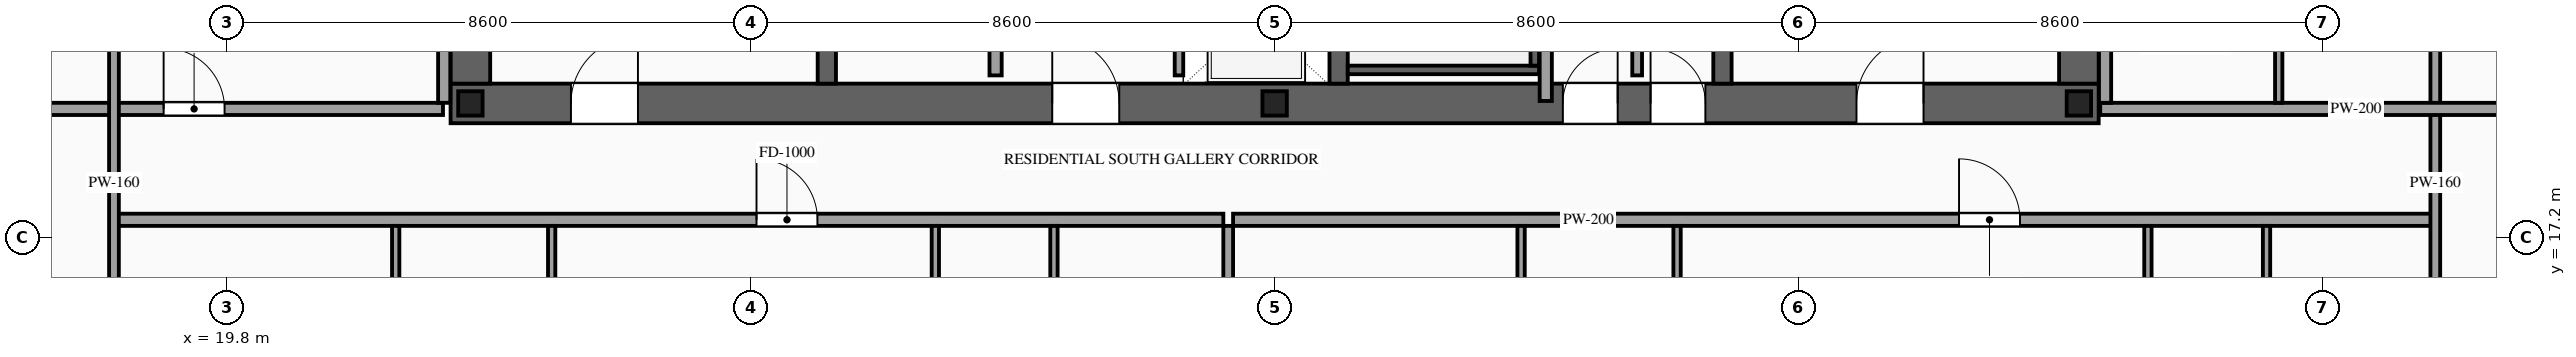
"""IFC4 building model, lengths in metres.
Left out: names, types, materials, properties, quantities, classifications, styles, units other than length and angle.
Written with IfcOpenShell. Run it as: python <this file> out.ifc"""

import sys

from ifc_helpers import new_model, si_unit, direction, frame, frame_2d, origin, origin_2d, place, context, subcontext, project, spatial, rectangle, i_section, extrude, source, transform, mapped, element, fill, save


model = new_model("IFC4")
c1 = context("Model", 3, precision=1e-05, world=origin(), true_north=direction((0.0, 1.0)))
c2 = subcontext(c1, "Body", "Model", "MODEL_VIEW")
j1 = project(units=[si_unit("LENGTHUNIT", "METRE"), si_unit("PLANEANGLEUNIT", "RADIAN")], contexts=[c1])
p1 = place(None, origin())
s1 = spatial("IfcSite", under=j1, at=p1, CompositionType="ELEMENT")
p2 = place(p1, origin())
s2 = spatial("IfcBuilding", under=s1, at=p2, CompositionType="ELEMENT")
p3 = place(p2, frame((0.0, 0.0, 195.0)))
s3 = spatial("IfcBuildingStorey", under=s2, at=p3, CompositionType="ELEMENT", Elevation=195.0)
p4 = place(p3, frame((23.475, 19.4, 0.0), z_axis=(0.0, 0.0, 1.0), x_axis=(1.0, 0.0, 0.0)))
e1 = element("IfcWall", 1, at=p4, inside=s3, PredefinedType="SHEAR", context=c2, shape_type="SweptSolid", body=[
    extrude(rectangle(XDim=27.05, YDim=0.65, at=frame_2d((13.525, 0.0))), origin(), (0.0, 0.0, 1.0), 3.5),
])
p5 = place(p4, frame((1.975, 0.0, 0.0)))
e2 = element("IfcOpeningElement", 2, at=p5, cuts=e1, PredefinedType="OPENING", context=c2, shape_type="SweptSolid", body=[
    extrude(rectangle(XDim=1.1, YDim=2.2, at=frame_2d((0.55, 1.1))), frame((0.0, 0.34, 0.0), z_axis=(0.0, -1.0, 0.0), x_axis=(1.0, 0.0, 0.0)), (0.0, 0.0, 1.0), 0.68),
])
p6 = place(p4, frame((9.875, 0.0, 0.0)))
e3 = element("IfcOpeningElement", 3, at=p6, cuts=e1, PredefinedType="OPENING", context=c2, shape_type="SweptSolid", body=[
    extrude(rectangle(XDim=1.1, YDim=2.2, at=frame_2d((0.55, 1.1))), frame((0.0, 0.34, 0.0), z_axis=(0.0, -1.0, 0.0), x_axis=(1.0, 0.0, 0.0)), (0.0, 0.0, 1.0), 0.68),
])
p7 = place(p4, frame((23.075, 0.0, 0.0)))
e4 = element("IfcOpeningElement", 4, at=p7, cuts=e1, PredefinedType="OPENING", context=c2, shape_type="SweptSolid", body=[
    extrude(rectangle(XDim=1.1, YDim=2.2, at=frame_2d((0.55, 1.1))), frame((0.0, 0.34, 0.0), z_axis=(0.0, -1.0, 0.0), x_axis=(1.0, 0.0, 0.0)), (0.0, 0.0, 1.0), 0.68),
])
p8 = place(p4, frame((19.695, 0.0, 0.0)))
e5 = element("IfcOpeningElement", 5, at=p8, cuts=e1, PredefinedType="OPENING", context=c2, shape_type="SweptSolid", body=[
    extrude(rectangle(XDim=0.9, YDim=2.15, at=frame_2d((0.45, 1.075))), frame((0.0, 0.34, 0.0), z_axis=(0.0, -1.0, 0.0), x_axis=(1.0, 0.0, 0.0)), (0.0, 0.0, 1.0), 0.68),
])
p9 = place(p4, frame((18.255, 0.0, 0.0)))
e6 = element("IfcOpeningElement", 6, at=p9, cuts=e1, PredefinedType="OPENING", context=c2, shape_type="SweptSolid", body=[
    extrude(rectangle(XDim=0.9, YDim=2.15, at=frame_2d((0.45, 1.075))), frame((0.0, 0.34, 0.0), z_axis=(0.0, -1.0, 0.0), x_axis=(1.0, 0.0, 0.0)), (0.0, 0.0, 1.0), 0.68),
])
m1 = source(origin(), c2, "Body", "SweptSolid", [
    extrude(rectangle(XDim=12.15, YDim=0.65, at=frame_2d((6.075, 0.0))), origin(), (0.0, 0.0, 1.0), 3.5),
])
for number, where, z_axis, x_axis in (
    (7, (23.8, 19.725, 0.0), (0.0, 0.0, 1.0), (0.0, 1.0, 0.0)),
    (8, (50.2, 19.725, 0.0), (0.0, 0.0, 1.0), (0.0, 1.0, 0.0)),
):
    element("IfcWall", number, at=place(p3, frame(where, z_axis=z_axis, x_axis=x_axis)), inside=s3, PredefinedType="SHEAR", context=c2, shape_type="MappedRepresentation", body=[
        mapped(m1, transform((0.0, 0.0, 0.0), scale=1.0)),
    ])
m2 = source(origin(), c2, "Body", "SweptSolid", [
    extrude(rectangle(XDim=12.15, YDim=0.3, at=frame_2d((6.075, 0.0))), origin(), (0.0, 0.0, 1.0), 3.5),
])
for number, where, z_axis, x_axis in (
    (9, (29.65, 19.725, 0.0), (0.0, 0.0, 1.0), (0.0, 1.0, 0.0)),
    (10, (38.05, 19.725, 0.0), (0.0, 0.0, 1.0), (0.0, 1.0, 0.0)),
    (11, (44.35, 19.725, 0.0), (0.0, 0.0, 1.0), (0.0, 1.0, 0.0)),
):
    element("IfcWall", number, at=place(p3, frame(where, z_axis=z_axis, x_axis=x_axis)), inside=s3, PredefinedType="SOLIDWALL", context=c2, shape_type="MappedRepresentation", body=[
        mapped(m2, transform((0.0, 0.0, 0.0), scale=1.0)),
    ])
m3 = source(origin(), c2, "Body", "SweptSolid", [
    extrude(i_section(OverallWidth=0.4, OverallDepth=0.4, WebThickness=0.013, FlangeThickness=0.021, at=origin_2d()), origin(), (0.0, 0.0, 1.0), 3.5),
])
for number, where, z_axis, x_axis in (
    (12, (23.8, 19.4, 0.0), (0.0, 0.0, 1.0), (1.0, 0.0, 0.0)),
    (13, (37.0, 19.4, 0.0), (0.0, 0.0, 1.0), (1.0, 0.0, 0.0)),
    (14, (50.2, 19.4, 0.0), (0.0, 0.0, 1.0), (1.0, 0.0, 0.0)),
):
    element("IfcColumn", number, at=place(p3, frame(where, z_axis=z_axis, x_axis=x_axis)), inside=s3, PredefinedType="COLUMN", context=c2, shape_type="MappedRepresentation", body=[
        mapped(m3, transform((0.0, 0.0, 0.0), scale=1.0)),
    ])
p10 = place(p3, frame((35.43, 19.86, 0.0), z_axis=(0.0, 0.0, 1.0), x_axis=(0.0, 1.0, 0.0)))
e15 = element("IfcWall", 15, at=p10, inside=s3, PredefinedType="SOLIDWALL", context=c2, shape_type="SweptSolid", body=[
    extrude(rectangle(XDim=2.04, YDim=0.14, at=frame_2d((1.02, 0.0))), origin(), (0.0, 0.0, 1.0), 3.28),
])
p11 = place(p10, frame((0.47, 0.0, 0.0)))
e16 = element("IfcOpeningElement", 16, at=p11, cuts=e15, PredefinedType="OPENING", context=c2, shape_type="SweptSolid", body=[
    extrude(rectangle(XDim=1.1, YDim=2.2, at=frame_2d((0.55, 1.1))), frame((0.0, 0.085, 0.0), z_axis=(0.0, -1.0, 0.0), x_axis=(1.0, 0.0, 0.0)), (0.0, 0.0, 1.0), 0.17),
])
m4 = source(origin(), c2, "Body", "SweptSolid", [
    extrude(rectangle(XDim=3.14, YDim=0.14, at=frame_2d((1.57, 0.0))), origin(), (0.0, 0.0, 1.0), 3.28),
])
p12 = place(p3, frame((38.2, 19.95, 0.0), z_axis=(0.0, 0.0, 1.0), x_axis=(1.0, 0.0, 0.0)))
e17 = element("IfcWall", 17, at=p12, inside=s3, PredefinedType="SOLIDWALL", context=c2, shape_type="MappedRepresentation", body=[
    mapped(m4, transform((0.0, 0.0, 0.0), scale=1.0)),
])
m5 = source(origin(), c2, "Body", "SweptSolid", [
    extrude(rectangle(XDim=8.94, YDim=0.14, at=frame_2d((4.47, 0.0))), origin(), (0.0, 0.0, 1.0), 3.28),
])
p13 = place(p3, frame((41.27, 20.02, 0.0), z_axis=(0.0, 0.0, 1.0), x_axis=(0.0, 1.0, 0.0)))
e18 = element("IfcWall", 18, at=p13, inside=s3, PredefinedType="SOLIDWALL", context=c2, shape_type="MappedRepresentation", body=[
    mapped(m5, transform((0.0, 0.0, 0.0), scale=1.0)),
])
p14 = place(p3, frame((32.42, 19.86, 0.0), z_axis=(0.0, 0.0, 1.0), x_axis=(0.0, 1.0, 0.0)))
e19 = element("IfcWall", 19, at=p14, inside=s3, PredefinedType="PARTITIONING", context=c2, shape_type="SweptSolid", body=[
    extrude(rectangle(XDim=7.94, YDim=0.2, at=frame_2d((3.97, 0.0))), origin(), (0.0, 0.0, 1.0), 3.28),
])
p15 = place(p14, frame((3.52, 0.0, 0.0)))
e20 = element("IfcOpeningElement", 20, at=p15, cuts=e19, PredefinedType="OPENING", context=c2, shape_type="SweptSolid", body=[
    extrude(rectangle(XDim=0.9, YDim=2.15, at=frame_2d((0.45, 1.075))), frame((0.0, 0.115, 0.0), z_axis=(0.0, -1.0, 0.0), x_axis=(1.0, 0.0, 0.0)), (0.0, 0.0, 1.0), 0.23),
])
m6 = source(origin(), c2, "Body", "SweptSolid", [
    extrude(rectangle(XDim=1.34, YDim=0.16, at=frame_2d((0.67, 0.0))), origin(), (0.0, 0.0, 1.0), 3.28),
])
p16 = place(p3, frame((42.95, 19.86, 0.0), z_axis=(0.0, 0.0, 1.0), x_axis=(0.0, 1.0, 0.0)))
e21 = element("IfcWall", 21, at=p16, inside=s3, PredefinedType="PARTITIONING", context=c2, shape_type="MappedRepresentation", body=[
    mapped(m6, transform((0.0, 0.0, 0.0), scale=1.0)),
])
m7 = source(origin(), c2, "Body", "SweptSolid", [
    extrude(rectangle(XDim=6.51, YDim=0.2, at=frame_2d((3.255, 0.0))), origin(), (0.0, 0.0, 1.0), 3.28),
])
p17 = place(p3, frame((41.45, 19.44, 0.0), z_axis=(0.0, 0.0, 1.0), x_axis=(0.0, 1.0, 0.0)))
e22 = element("IfcWall", 22, at=p17, inside=s3, PredefinedType="PARTITIONING", context=c2, shape_type="MappedRepresentation", body=[
    mapped(m7, transform((0.0, 0.0, 0.0), scale=1.0)),
])
p18 = place(p3, frame((17.94, 17.49, 0.0), z_axis=(0.0, 0.0, 1.0), x_axis=(1.0, 0.0, 0.0)))
e23 = element("IfcWall", 23, at=p18, inside=s3, PredefinedType="PARTITIONING", context=c2, shape_type="SweptSolid", body=[
    extrude(rectangle(XDim=18.218, YDim=0.2, at=frame_2d((9.109, 0.0))), origin(), (0.0, 0.0, 1.0), 3.28),
])
p19 = place(p18, frame((10.556, 0.0, 0.0)))
e24 = element("IfcOpeningElement", 24, at=p19, cuts=e23, PredefinedType="OPENING", context=c2, shape_type="SweptSolid", body=[
    extrude(rectangle(XDim=1.0, YDim=2.2, at=frame_2d((0.5, 1.1))), frame((0.0, 0.115, 0.0), z_axis=(0.0, -1.0, 0.0), x_axis=(1.0, 0.0, 0.0)), (0.0, 0.0, 1.0), 0.23),
])
m8 = source(origin(), c2, "Body", "SweptSolid", [
    extrude(rectangle(XDim=13.54, YDim=0.16, at=frame_2d((6.77, 0.0))), origin(), (0.0, 0.0, 1.0), 3.28),
])
p20 = place(p3, frame((36.238, 3.85, 0.0), z_axis=(0.0, 0.0, 1.0), x_axis=(0.0, 1.0, 0.0)))
e25 = element("IfcWall", 25, at=p20, inside=s3, PredefinedType="PARTITIONING", context=c2, shape_type="MappedRepresentation", body=[
    mapped(m8, transform((0.0, 0.0, 0.0), scale=1.0)),
])
m9 = source(origin(), c2, "Body", "SweptSolid", [
    extrude(rectangle(XDim=5.61, YDim=0.12, at=frame_2d((2.805, 0.0))), origin(), (0.0, 0.0, 1.0), 3.28),
])
p21 = place(p3, frame((22.574, 11.78, 0.0), z_axis=(0.0, 0.0, 1.0), x_axis=(0.0, 1.0, 0.0)))
e26 = element("IfcWall", 26, at=p21, inside=s3, PredefinedType="PARTITIONING", context=c2, shape_type="MappedRepresentation", body=[
    mapped(m9, transform((0.0, 0.0, 0.0), scale=1.0)),
])
p22 = place(p3, frame((25.134, 11.78, 0.0), z_axis=(0.0, 0.0, 1.0), x_axis=(0.0, 1.0, 0.0)))
e27 = element("IfcWall", 27, at=p22, inside=s3, PredefinedType="PARTITIONING", context=c2, shape_type="SweptSolid", body=[
    extrude(rectangle(XDim=5.61, YDim=0.12, at=frame_2d((2.805, 0.0))), origin(), (0.0, 0.0, 1.0), 3.28),
])
p23 = place(p22, frame((2.38, 0.0, 0.0)))
e28 = element("IfcOpeningElement", 28, at=p23, cuts=e27, PredefinedType="OPENING", context=c2, shape_type="SweptSolid", body=[
    extrude(rectangle(XDim=0.85, YDim=2.1, at=frame_2d((0.425, 1.05))), frame((0.0, 0.075, 0.0), z_axis=(0.0, -1.0, 0.0), x_axis=(1.0, 0.0, 0.0)), (0.0, 0.0, 1.0), 0.15),
])
for number, where, z_axis, x_axis in (
    (29, (33.378, 11.78, 0.0), (0.0, 0.0, 1.0), (0.0, 1.0, 0.0)),
    (30, (31.431, 11.78, 0.0), (0.0, 0.0, 1.0), (0.0, 1.0, 0.0)),
):
    element("IfcWall", number, at=place(p3, frame(where, z_axis=z_axis, x_axis=x_axis)), inside=s3, PredefinedType="PARTITIONING", context=c2, shape_type="MappedRepresentation", body=[
        mapped(m9, transform((0.0, 0.0, 0.0), scale=1.0)),
    ])
p24 = place(p3, frame((36.318, 17.49, 0.0), z_axis=(0.0, 0.0, 1.0), x_axis=(1.0, 0.0, 0.0)))
e31 = element("IfcWall", 31, at=p24, inside=s3, PredefinedType="PARTITIONING", context=c2, shape_type="SweptSolid", body=[
    extrude(rectangle(XDim=19.742, YDim=0.2, at=frame_2d((9.871, 0.0))), origin(), (0.0, 0.0, 1.0), 3.28),
])
p25 = place(p24, frame((11.915, 0.0, 0.0)))
e32 = element("IfcOpeningElement", 32, at=p25, cuts=e31, PredefinedType="OPENING", context=c2, shape_type="SweptSolid", body=[
    extrude(rectangle(XDim=1.0, YDim=2.2, at=frame_2d((0.5, 1.1))), frame((0.0, 0.115, 0.0), z_axis=(0.0, -1.0, 0.0), x_axis=(1.0, 0.0, 0.0)), (0.0, 0.0, 1.0), 0.23),
])
p26 = place(p3, frame((41.045, 11.78, 0.0), z_axis=(0.0, 0.0, 1.0), x_axis=(0.0, 1.0, 0.0)))
e33 = element("IfcWall", 33, at=p26, inside=s3, PredefinedType="PARTITIONING", context=c2, shape_type="MappedRepresentation", body=[
    mapped(m9, transform((0.0, 0.0, 0.0), scale=1.0)),
])
p27 = place(p3, frame((43.605, 11.78, 0.0), z_axis=(0.0, 0.0, 1.0), x_axis=(0.0, 1.0, 0.0)))
e34 = element("IfcWall", 34, at=p27, inside=s3, PredefinedType="PARTITIONING", context=c2, shape_type="SweptSolid", body=[
    extrude(rectangle(XDim=5.61, YDim=0.12, at=frame_2d((2.805, 0.0))), origin(), (0.0, 0.0, 1.0), 3.28),
])
p28 = place(p27, frame((2.38, 0.0, 0.0)))
e35 = element("IfcOpeningElement", 35, at=p28, cuts=e34, PredefinedType="OPENING", context=c2, shape_type="SweptSolid", body=[
    extrude(rectangle(XDim=0.85, YDim=2.1, at=frame_2d((0.425, 1.05))), frame((0.0, 0.075, 0.0), z_axis=(0.0, -1.0, 0.0), x_axis=(1.0, 0.0, 0.0)), (0.0, 0.0, 1.0), 0.15),
])
for number, where, z_axis, x_axis in (
    (36, (53.28, 11.78, 0.0), (0.0, 0.0, 1.0), (0.0, 1.0, 0.0)),
    (37, (51.333, 11.78, 0.0), (0.0, 0.0, 1.0), (0.0, 1.0, 0.0)),
):
    element("IfcWall", number, at=place(p3, frame(where, z_axis=z_axis, x_axis=x_axis)), inside=s3, PredefinedType="PARTITIONING", context=c2, shape_type="MappedRepresentation", body=[
        mapped(m9, transform((0.0, 0.0, 0.0), scale=1.0)),
    ])
p29 = place(p3, frame((15.05, 19.31, 0.0), z_axis=(0.0, 0.0, 1.0), x_axis=(1.0, 0.0, 0.0)))
e38 = element("IfcWall", 38, at=p29, inside=s3, PredefinedType="PARTITIONING", context=c2, shape_type="SweptSolid", body=[
    extrude(rectangle(XDim=8.3, YDim=0.2, at=frame_2d((4.15, 0.0))), origin(), (0.0, 0.0, 1.0), 2.775),
])
p30 = place(p29, frame((3.715, 0.0, 0.0)))
e39 = element("IfcOpeningElement", 39, at=p30, cuts=e38, PredefinedType="OPENING", context=c2, shape_type="SweptSolid", body=[
    extrude(rectangle(XDim=1.0, YDim=2.2, at=frame_2d((0.5, 1.1))), frame((0.0, 0.115, 0.0), z_axis=(0.0, -1.0, 0.0), x_axis=(1.0, 0.0, 0.0)), (0.0, 0.0, 1.0), 0.23),
])
m10 = source(origin(), c2, "Body", "SweptSolid", [
    extrude(rectangle(XDim=6.29, YDim=0.2, at=frame_2d((3.145, 0.0))), origin(), (0.0, 0.0, 1.0), 3.28),
])
p31 = place(p3, frame((23.37, 19.41, 0.0), z_axis=(0.0, 0.0, 1.0), x_axis=(0.0, 1.0, 0.0)))
e40 = element("IfcWall", 40, at=p31, inside=s3, PredefinedType="PARTITIONING", context=c2, shape_type="MappedRepresentation", body=[
    mapped(m10, transform((0.0, 0.0, 0.0), scale=1.0)),
])
m11 = source(origin(), c2, "Body", "SweptSolid", [
    extrude(rectangle(XDim=28.19, YDim=0.16, at=frame_2d((14.095, 0.0))), origin(), (0.0, 0.0, 1.0), 3.28),
])
for number, where, z_axis, x_axis in (
    (41, (17.95, 4.0, 0.0), (0.0, 0.0, 1.0), (0.0, 1.0, 0.0)),
    (42, (56.05, 4.0, 0.0), (0.0, 0.0, 1.0), (0.0, 1.0, 0.0)),
):
    element("IfcWall", number, at=place(p3, frame(where, z_axis=z_axis, x_axis=x_axis)), inside=s3, PredefinedType="PARTITIONING", context=c2, shape_type="MappedRepresentation", body=[
        mapped(m11, transform((0.0, 0.0, 0.0), scale=1.0)),
    ])
m12 = source(origin(), c2, "Body", "SweptSolid", [
    extrude(rectangle(XDim=8.4, YDim=0.2, at=frame_2d((4.2, 0.0))), origin(), (0.0, 0.0, 1.0), 2.775),
])
p32 = place(p3, frame((50.55, 19.31, 0.0), z_axis=(0.0, 0.0, 1.0), x_axis=(1.0, 0.0, 0.0)))
e43 = element("IfcWall", 43, at=p32, inside=s3, PredefinedType="PARTITIONING", context=c2, shape_type="MappedRepresentation", body=[
    mapped(m12, transform((0.0, 0.0, 0.0), scale=1.0)),
])
m13 = source(origin(), c2, "Body", "SweptSolid", [
    extrude(rectangle(XDim=12.78, YDim=0.2, at=frame_2d((6.39, 0.0))), origin(), (0.0, 0.0, 1.0), 3.28),
])
p33 = place(p3, frame((50.63, 19.41, 0.0), z_axis=(0.0, 0.0, 1.0), x_axis=(0.0, 1.0, 0.0)))
e44 = element("IfcWall", 44, at=p33, inside=s3, PredefinedType="PARTITIONING", context=c2, shape_type="MappedRepresentation", body=[
    mapped(m13, transform((0.0, 0.0, 0.0), scale=1.0)),
])
p34 = place(p3, frame((53.48, 19.41, 0.0), z_axis=(0.0, 0.0, 1.0), x_axis=(0.0, 1.0, 0.0)))
e45 = element("IfcWall", 45, at=p34, inside=s3, PredefinedType="PARTITIONING", context=c2, shape_type="SweptSolid", body=[
    extrude(rectangle(XDim=5.623, YDim=0.12, at=frame_2d((2.812, 0.0))), origin(), (0.0, 0.0, 1.0), 3.28),
])
p35 = place(p34, frame((2.386, 0.0, 0.0)))
e46 = element("IfcOpeningElement", 46, at=p35, cuts=e45, PredefinedType="OPENING", context=c2, shape_type="SweptSolid", body=[
    extrude(rectangle(XDim=0.85, YDim=2.1, at=frame_2d((0.425, 1.05))), frame((0.0, 0.075, 0.0), z_axis=(0.0, -1.0, 0.0), x_axis=(1.0, 0.0, 0.0)), (0.0, 0.0, 1.0), 0.15),
])
m14 = source(origin(), c2, "Body", "SweptSolid", [
    extrude(rectangle(XDim=1.1, YDim=2.2, at=frame_2d((0.55, 1.1))), frame((0.0, 0.025, 0.0), z_axis=(0.0, -1.0, 0.0), x_axis=(1.0, 0.0, 0.0)), (0.0, 0.0, 1.0), 0.05),
])
p36 = place(p5, origin())
e47 = element("IfcDoor", 47, at=p36, inside=s3, OperationType="SINGLE_SWING_RIGHT", PredefinedType="DOOR", context=c2, shape_type="MappedRepresentation", body=[
    mapped(m14, transform((0.0, 0.0, 0.0), scale=1.0)),
])
fill(e2, e47)
p37 = place(p6, origin())
e48 = element("IfcDoor", 48, at=p37, inside=s3, OperationType="SINGLE_SWING_LEFT", PredefinedType="DOOR", context=c2, shape_type="MappedRepresentation", body=[
    mapped(m14, transform((0.0, 0.0, 0.0), scale=1.0)),
])
fill(e3, e48)
p38 = place(p7, origin())
e49 = element("IfcDoor", 49, at=p38, inside=s3, OperationType="SINGLE_SWING_RIGHT", PredefinedType="DOOR", context=c2, shape_type="MappedRepresentation", body=[
    mapped(m14, transform((0.0, 0.0, 0.0), scale=1.0)),
])
fill(e4, e49)
m15 = source(origin(), c2, "Body", "SweptSolid", [
    extrude(rectangle(XDim=0.9, YDim=2.15, at=frame_2d((0.45, 1.075))), frame((0.0, 0.025, 0.0), z_axis=(0.0, -1.0, 0.0), x_axis=(1.0, 0.0, 0.0)), (0.0, 0.0, 1.0), 0.05),
])
p39 = place(p8, origin())
e50 = element("IfcDoor", 50, at=p39, inside=s3, OperationType="SINGLE_SWING_LEFT", PredefinedType="DOOR", context=c2, shape_type="MappedRepresentation", body=[
    mapped(m15, transform((0.0, 0.0, 0.0), scale=1.0)),
])
fill(e5, e50)
p40 = place(p9, origin())
e51 = element("IfcDoor", 51, at=p40, inside=s3, OperationType="SINGLE_SWING_RIGHT", PredefinedType="DOOR", context=c2, shape_type="MappedRepresentation", body=[
    mapped(m15, transform((0.0, 0.0, 0.0), scale=1.0)),
])
fill(e6, e51)
m16 = source(origin(), c2, "Body", "SweptSolid", [
    extrude(rectangle(XDim=1.0, YDim=2.2, at=frame_2d((0.5, 1.1))), frame((0.0, 0.025, 0.0), z_axis=(0.0, -1.0, 0.0), x_axis=(1.0, 0.0, 0.0)), (0.0, 0.0, 1.0), 0.05),
])
p41 = place(p19, origin())
e52 = element("IfcDoor", 52, at=p41, inside=s3, OperationType="SINGLE_SWING_LEFT", PredefinedType="DOOR", context=c2, shape_type="MappedRepresentation", body=[
    mapped(m16, transform((0.0, 0.0, 0.0), scale=1.0)),
])
fill(e24, e52)
p42 = place(p25, origin())
e53 = element("IfcDoor", 53, at=p42, inside=s3, OperationType="SINGLE_SWING_LEFT", PredefinedType="DOOR", context=c2, shape_type="MappedRepresentation", body=[
    mapped(m16, transform((0.0, 0.0, 0.0), scale=1.0)),
])
fill(e32, e53)
p43 = place(p30, origin())
e54 = element("IfcDoor", 54, at=p43, inside=s3, OperationType="SINGLE_SWING_LEFT", PredefinedType="DOOR", context=c2, shape_type="MappedRepresentation", body=[
    mapped(m16, transform((0.0, 0.0, 0.0), scale=1.0)),
])
fill(e39, e54)
save(model, sys.argv[1])
